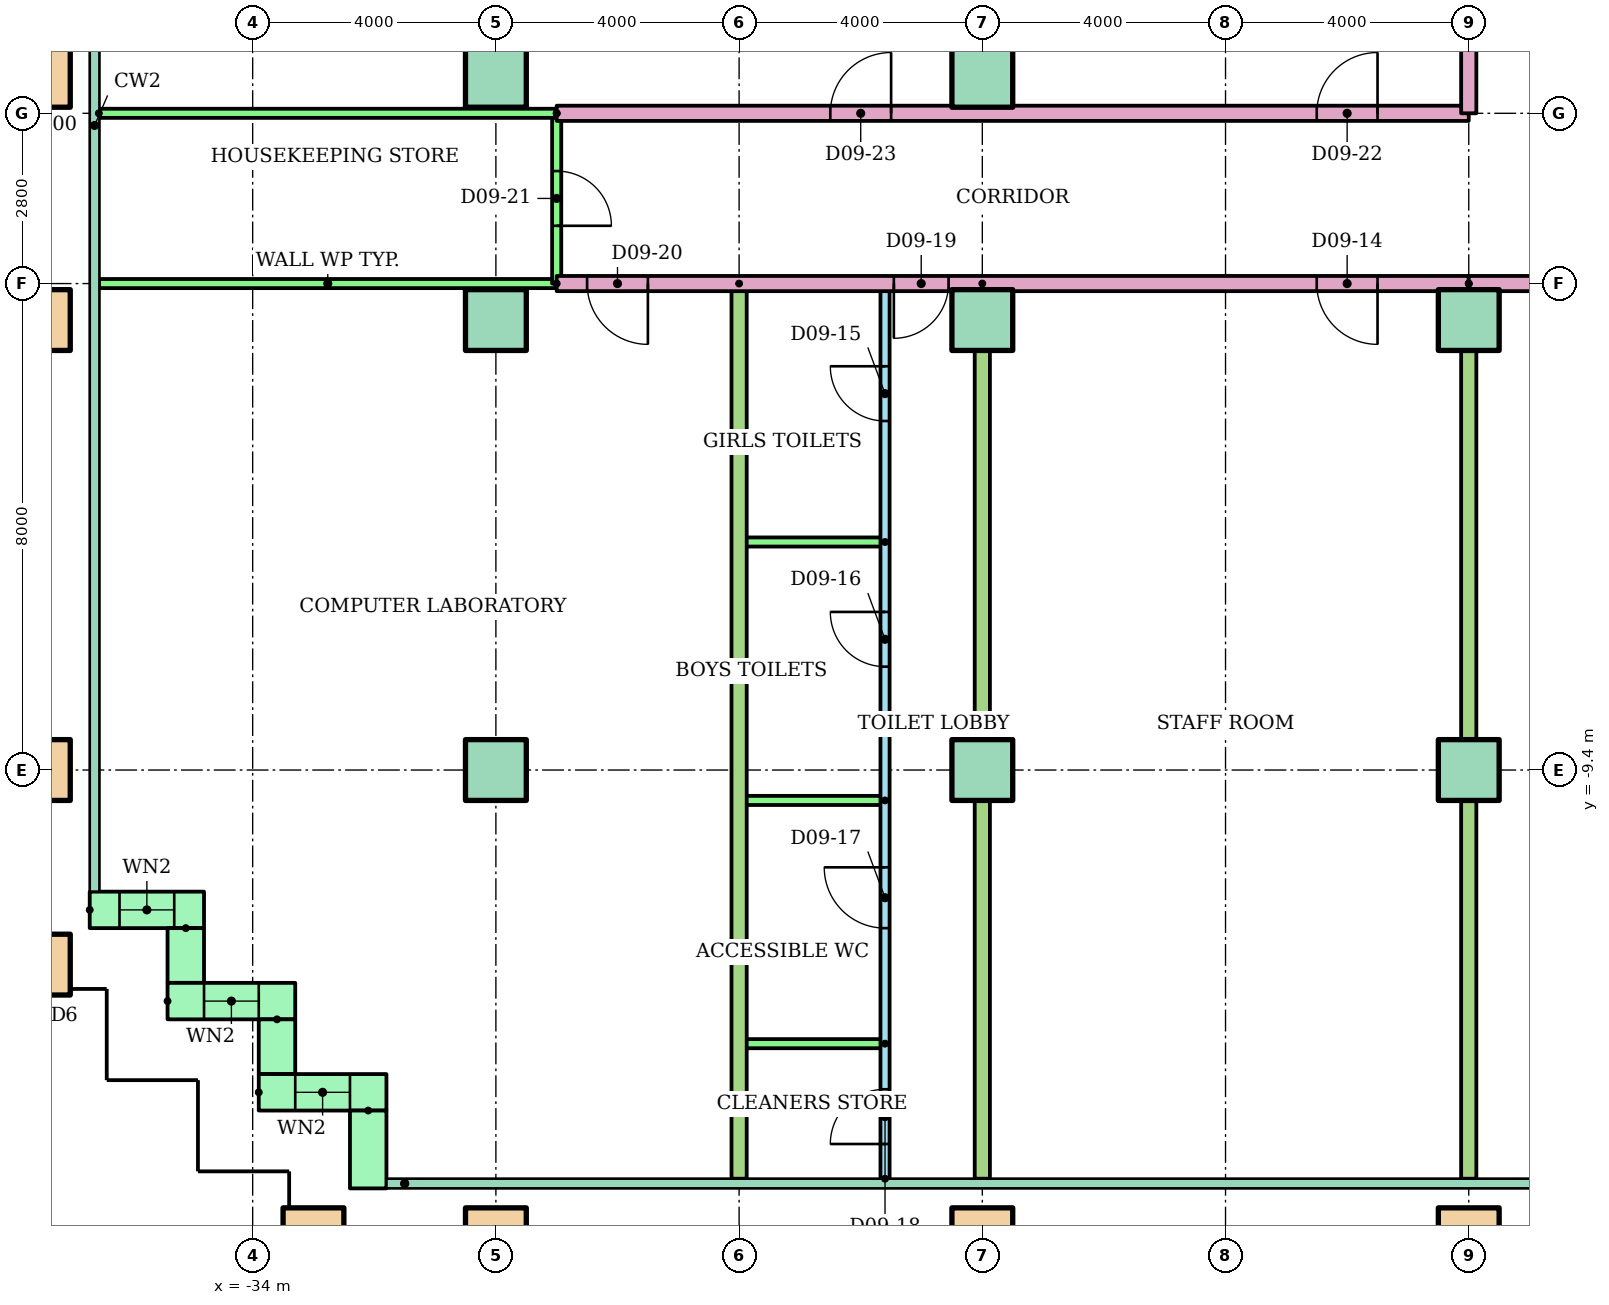
"""IFC4 building model, lengths in metres.
Left out: names, types, materials, properties, quantities, classifications, styles, units other than length and angle.
Written with IfcOpenShell. Run it as: python <this file> out.ifc"""

import sys

from ifc_helpers import new_model, si_unit, direction, frame, frame_2d, origin, origin_2d, place, context, subcontext, project, spatial, rectangle, hollow_rectangle, extrude, element, fill, save


model = new_model("IFC4")
c1 = context("Model", 3, precision=1e-05, world=origin(), true_north=direction((0.0, 1.0)))
c2 = subcontext(c1, "Body", "Model", "MODEL_VIEW")
j1 = project(units=[si_unit("LENGTHUNIT", "METRE"), si_unit("PLANEANGLEUNIT", "RADIAN")], contexts=[c1])
p1 = place(None, origin())
s1 = spatial("IfcSite", under=j1, at=p1, CompositionType="ELEMENT")
p2 = place(p1, origin())
s2 = spatial("IfcBuilding", under=s1, at=p2, CompositionType="ELEMENT")
p3 = place(p2, frame((0.0, 0.0, 37.7)))
s3 = spatial("IfcBuildingStorey", under=s2, at=p3, CompositionType="ELEMENT", Elevation=37.7)
for number, where in (
    (1, (-33.0, -17.1, 0.0)),
    (2, (-30.0, -17.1, 0.0)),
    (3, (-22.0, -17.1, 0.0)),
    (4, (-14.0, -17.1, 0.0)),
    (5, (-37.5, -12.6, 0.0)),
    (6, (-37.5, -9.4, 0.0)),
):
    element("IfcColumn", number, at=place(p3, frame(where)), inside=s3, PredefinedType="COLUMN", context=c2, shape_type="SweptSolid", body=[
        extrude(hollow_rectangle(XDim=1.0, YDim=1.0, WallThickness=0.05, at=origin_2d()), origin(), (0.0, 0.0, 1.0), 3.9),
    ])
for number, where in (
    (7, (-30.0, -9.4, 0.0)),
    (8, (-22.0, -9.4, 0.0)),
    (9, (-14.0, -9.4, 0.0)),
):
    element("IfcColumn", number, at=place(p3, frame(where)), inside=s3, PredefinedType="COLUMN", context=c2, shape_type="SweptSolid", body=[
        extrude(rectangle(XDim=1.0, YDim=1.0, at=origin_2d()), origin(), (0.0, 0.0, 1.0), 3.9),
    ])
p4 = place(p3, frame((-37.5, -2.0, 0.0)))
e10 = element("IfcColumn", 10, at=p4, inside=s3, PredefinedType="COLUMN", context=c2, shape_type="SweptSolid", body=[
    extrude(hollow_rectangle(XDim=1.0, YDim=1.0, WallThickness=0.05, at=origin_2d()), origin(), (0.0, 0.0, 1.0), 3.9),
])
for number, where in (
    (11, (-30.0, -2.0, 0.0)),
    (12, (-22.0, -2.0, 0.0)),
    (13, (-14.0, -2.0, 0.0)),
):
    element("IfcColumn", number, at=place(p3, frame(where)), inside=s3, PredefinedType="COLUMN", context=c2, shape_type="SweptSolid", body=[
        extrude(rectangle(XDim=1.0, YDim=1.0, at=origin_2d()), origin(), (0.0, 0.0, 1.0), 3.9),
    ])
p5 = place(p3, frame((-37.5, 2.0, 0.0)))
e14 = element("IfcColumn", 14, at=p5, inside=s3, PredefinedType="COLUMN", context=c2, shape_type="SweptSolid", body=[
    extrude(hollow_rectangle(XDim=1.0, YDim=1.0, WallThickness=0.05, at=origin_2d()), origin(), (0.0, 0.0, 1.0), 3.9),
])
for number, where in (
    (15, (-30.0, 2.0, 0.0)),
    (16, (-22.0, 2.0, 0.0)),
):
    element("IfcColumn", number, at=place(p3, frame(where)), inside=s3, PredefinedType="COLUMN", context=c2, shape_type="SweptSolid", body=[
        extrude(rectangle(XDim=1.0, YDim=1.0, at=origin_2d()), origin(), (0.0, 0.0, 1.0), 3.9),
    ])
p6 = place(p3, frame((-36.68, -11.7, 0.0)))
e17 = element("IfcWall", 17, at=p6, inside=s3, PredefinedType="STANDARD", context=c2, shape_type="SweptSolid", body=[
    extrude(rectangle(XDim=1.88, YDim=0.6, at=frame_2d((0.94, 0.0))), origin(), (0.0, 0.0, 1.0), 3.62),
])
p7 = place(p6, frame((0.49, 0.0, 0.9)))
e18 = element("IfcOpeningElement", 18, at=p7, cuts=e17, PredefinedType="OPENING", context=c2, shape_type="SweptSolid", body=[
    extrude(rectangle(XDim=0.9, YDim=1.8, at=frame_2d((0.45, 0.9))), frame((0.0, 0.31, 0.0), z_axis=(0.0, -1.0, 0.0), x_axis=(1.0, 0.0, 0.0)), (0.0, 0.0, 1.0), 0.62),
])
p8 = place(p3, frame((-35.1, -12.0, 0.0), z_axis=(0.0, 0.0, 1.0), x_axis=(0.0, -1.0, 0.0)))
e19 = element("IfcWall", 19, at=p8, inside=s3, PredefinedType="STANDARD", context=c2, shape_type="SweptSolid", body=[
    extrude(rectangle(XDim=0.9, YDim=0.6, at=frame_2d((0.45, 0.0))), origin(), (0.0, 0.0, 1.0), 3.62),
])
p9 = place(p3, frame((-35.4, -13.2, 0.0)))
e20 = element("IfcWall", 20, at=p9, inside=s3, PredefinedType="STANDARD", context=c2, shape_type="SweptSolid", body=[
    extrude(rectangle(XDim=2.1, YDim=0.6, at=frame_2d((1.05, 0.0))), origin(), (0.0, 0.0, 1.0), 3.62),
])
p10 = place(p9, frame((0.6, 0.0, 0.9)))
e21 = element("IfcOpeningElement", 21, at=p10, cuts=e20, PredefinedType="OPENING", context=c2, shape_type="SweptSolid", body=[
    extrude(rectangle(XDim=0.9, YDim=1.8, at=frame_2d((0.45, 0.9))), frame((0.0, 0.31, 0.0), z_axis=(0.0, -1.0, 0.0), x_axis=(1.0, 0.0, 0.0)), (0.0, 0.0, 1.0), 0.62),
])
p11 = place(p3, frame((-33.6, -13.5, 0.0), z_axis=(0.0, 0.0, 1.0), x_axis=(0.0, -1.0, 0.0)))
e22 = element("IfcWall", 22, at=p11, inside=s3, PredefinedType="STANDARD", context=c2, shape_type="SweptSolid", body=[
    extrude(rectangle(XDim=0.9, YDim=0.6, at=frame_2d((0.45, 0.0))), origin(), (0.0, 0.0, 1.0), 3.62),
])
p12 = place(p3, frame((-33.9, -14.7, 0.0)))
e23 = element("IfcWall", 23, at=p12, inside=s3, PredefinedType="STANDARD", context=c2, shape_type="SweptSolid", body=[
    extrude(rectangle(XDim=2.1, YDim=0.6, at=frame_2d((1.05, 0.0))), origin(), (0.0, 0.0, 1.0), 3.62),
])
p13 = place(p12, frame((0.6, 0.0, 0.9)))
e24 = element("IfcOpeningElement", 24, at=p13, cuts=e23, PredefinedType="OPENING", context=c2, shape_type="SweptSolid", body=[
    extrude(rectangle(XDim=0.9, YDim=1.8, at=frame_2d((0.45, 0.9))), frame((0.0, 0.31, 0.0), z_axis=(0.0, -1.0, 0.0), x_axis=(1.0, 0.0, 0.0)), (0.0, 0.0, 1.0), 0.62),
])
p14 = place(p3, frame((-32.1, -15.0, 0.0), z_axis=(0.0, 0.0, 1.0), x_axis=(0.0, -1.0, 0.0)))
e25 = element("IfcWall", 25, at=p14, inside=s3, PredefinedType="STANDARD", context=c2, shape_type="SweptSolid", body=[
    extrude(rectangle(XDim=1.28, YDim=0.6, at=frame_2d((0.64, 0.0))), origin(), (0.0, 0.0, 1.0), 3.62),
])
p15 = place(p3, frame((-14.0, -1.4, 0.0), z_axis=(0.0, 0.0, 1.0), x_axis=(-1.0, 0.0, 0.0)))
e26 = element("IfcWall", 26, at=p15, inside=s3, PredefinedType="PARTITIONING", context=c2, shape_type="SweptSolid", body=[
    extrude(rectangle(XDim=15.0, YDim=0.25, at=frame_2d((7.5, 0.0))), origin(), (0.0, 0.0, 1.0), 3.1),
])
p16 = place(p15, frame((1.5, 0.0, 0.0)))
e27 = element("IfcOpeningElement", 27, at=p16, cuts=e26, PredefinedType="OPENING", context=c2, shape_type="SweptSolid", body=[
    extrude(rectangle(XDim=1.0, YDim=2.1, at=frame_2d((0.5, 1.05))), frame((0.0, 0.135, 0.0), z_axis=(0.0, -1.0, 0.0), x_axis=(1.0, 0.0, 0.0)), (0.0, 0.0, 1.0), 0.27),
])
p17 = place(p15, frame((8.555, 0.0, 0.0)))
e28 = element("IfcOpeningElement", 28, at=p17, cuts=e26, PredefinedType="OPENING", context=c2, shape_type="SweptSolid", body=[
    extrude(rectangle(XDim=0.9, YDim=2.1, at=frame_2d((0.45, 1.05))), frame((0.0, 0.135, 0.0), z_axis=(0.0, -1.0, 0.0), x_axis=(1.0, 0.0, 0.0)), (0.0, 0.0, 1.0), 0.27),
])
p18 = place(p15, frame((13.5, 0.0, 0.0)))
e29 = element("IfcOpeningElement", 29, at=p18, cuts=e26, PredefinedType="OPENING", context=c2, shape_type="SweptSolid", body=[
    extrude(rectangle(XDim=1.0, YDim=2.1, at=frame_2d((0.5, 1.05))), frame((0.0, 0.135, 0.0), z_axis=(0.0, -1.0, 0.0), x_axis=(1.0, 0.0, 0.0)), (0.0, 0.0, 1.0), 0.27),
])
p19 = place(p3, frame((-29.0, -1.4, 0.0), z_axis=(0.0, 0.0, 1.0), x_axis=(-1.0, 0.0, 0.0)))
e30 = element("IfcWall", 30, at=p19, inside=s3, PredefinedType="PARTITIONING", context=c2, shape_type="SweptSolid", body=[
    extrude(rectangle(XDim=7.53, YDim=0.15, at=frame_2d((3.765, 0.0))), origin(), (0.0, 0.0, 1.0), 3.1),
])
p20 = place(p3, frame((-29.0, 1.4, 0.0), z_axis=(0.0, 0.0, 1.0), x_axis=(0.0, -1.0, 0.0)))
e31 = element("IfcWall", 31, at=p20, inside=s3, PredefinedType="PARTITIONING", context=c2, shape_type="SweptSolid", body=[
    extrude(rectangle(XDim=2.8, YDim=0.15, at=frame_2d((1.4, 0.0))), origin(), (0.0, 0.0, 1.0), 3.1),
])
p21 = place(p20, frame((0.95, 0.0, 0.0)))
e32 = element("IfcOpeningElement", 32, at=p21, cuts=e31, PredefinedType="OPENING", context=c2, shape_type="SweptSolid", body=[
    extrude(rectangle(XDim=0.9, YDim=2.1, at=frame_2d((0.45, 1.05))), frame((0.0, 0.085, 0.0), z_axis=(0.0, -1.0, 0.0), x_axis=(1.0, 0.0, 0.0)), (0.0, 0.0, 1.0), 0.17),
])
p22 = place(p3, frame((-23.6, -16.121, 0.0), z_axis=(0.0, 0.0, 1.0), x_axis=(0.0, 1.0, 0.0)))
e33 = element("IfcWall", 33, at=p22, inside=s3, PredefinedType="PARTITIONING", context=c2, shape_type="SweptSolid", body=[
    extrude(rectangle(XDim=14.721, YDim=0.15, at=frame_2d((7.361, 0.0))), origin(), (0.0, 0.0, 1.0), 3.1),
])
p23 = place(p22, frame((12.461, 0.0, 0.0)))
e34 = element("IfcOpeningElement", 34, at=p23, cuts=e33, PredefinedType="OPENING", context=c2, shape_type="SweptSolid", body=[
    extrude(rectangle(XDim=0.9, YDim=2.1, at=frame_2d((0.45, 1.05))), frame((0.0, 0.085, 0.0), z_axis=(0.0, -1.0, 0.0), x_axis=(1.0, 0.0, 0.0)), (0.0, 0.0, 1.0), 0.17),
])
p24 = place(p22, frame((8.421, 0.0, 0.0)))
e35 = element("IfcOpeningElement", 35, at=p24, cuts=e33, PredefinedType="OPENING", context=c2, shape_type="SweptSolid", body=[
    extrude(rectangle(XDim=0.9, YDim=2.1, at=frame_2d((0.45, 1.05))), frame((0.0, 0.085, 0.0), z_axis=(0.0, -1.0, 0.0), x_axis=(1.0, 0.0, 0.0)), (0.0, 0.0, 1.0), 0.17),
])
p25 = place(p22, frame((4.121, 0.0, 0.0)))
e36 = element("IfcOpeningElement", 36, at=p25, cuts=e33, PredefinedType="OPENING", context=c2, shape_type="SweptSolid", body=[
    extrude(rectangle(XDim=1.0, YDim=2.1, at=frame_2d((0.5, 1.05))), frame((0.0, 0.085, 0.0), z_axis=(0.0, -1.0, 0.0), x_axis=(1.0, 0.0, 0.0)), (0.0, 0.0, 1.0), 0.17),
])
p26 = place(p22, frame((0.571, 0.0, 0.0)))
e37 = element("IfcOpeningElement", 37, at=p26, cuts=e33, PredefinedType="OPENING", context=c2, shape_type="SweptSolid", body=[
    extrude(rectangle(XDim=0.9, YDim=2.1, at=frame_2d((0.45, 1.05))), frame((0.0, 0.085, 0.0), z_axis=(0.0, -1.0, 0.0), x_axis=(1.0, 0.0, 0.0)), (0.0, 0.0, 1.0), 0.17),
])
for number, where, z_axis, x_axis in (
    (38, (-23.6, -5.65, 0.0), (0.0, 0.0, 1.0), (-1.0, 0.0, 0.0)),
    (39, (-23.6, -9.9, 0.0), (0.0, 0.0, 1.0), (-1.0, 0.0, 0.0)),
    (40, (-23.6, -13.9, 0.0), (0.0, 0.0, 1.0), (-1.0, 0.0, 0.0)),
):
    element("IfcWall", number, at=place(p3, frame(where, z_axis=z_axis, x_axis=x_axis)), inside=s3, PredefinedType="PARTITIONING", context=c2, shape_type="SweptSolid", body=[
        extrude(rectangle(XDim=2.4, YDim=0.15, at=frame_2d((1.2, 0.0))), origin(), (0.0, 0.0, 1.0), 3.1),
    ])
for number, where, z_axis, x_axis in (
    (41, (-26.0, -1.4, 0.0), (0.0, 0.0, 1.0), (0.0, -1.0, 0.0)),
    (42, (-22.0, -1.4, 0.0), (0.0, 0.0, 1.0), (0.0, -1.0, 0.0)),
    (43, (-14.0, -1.4, 0.0), (0.0, 0.0, 1.0), (0.0, -1.0, 0.0)),
):
    element("IfcWall", number, at=place(p3, frame(where, z_axis=z_axis, x_axis=x_axis)), inside=s3, PredefinedType="PARTITIONING", context=c2, shape_type="SweptSolid", body=[
        extrude(rectangle(XDim=14.721, YDim=0.25, at=frame_2d((7.361, 0.0))), origin(), (0.0, 0.0, 1.0), 3.1),
    ])
p27 = place(p3, frame((-29.0, 1.4, 0.0)))
e44 = element("IfcWall", 44, at=p27, inside=s3, PredefinedType="PARTITIONING", context=c2, shape_type="SweptSolid", body=[
    extrude(rectangle(XDim=15.0, YDim=0.25, at=frame_2d((7.5, 0.0))), origin(), (0.0, 0.0, 1.0), 3.1),
])
p28 = place(p27, frame((12.5, 0.0, 0.0)))
e45 = element("IfcOpeningElement", 45, at=p28, cuts=e44, PredefinedType="OPENING", context=c2, shape_type="SweptSolid", body=[
    extrude(rectangle(XDim=1.0, YDim=2.1, at=frame_2d((0.5, 1.05))), frame((0.0, 0.135, 0.0), z_axis=(0.0, -1.0, 0.0), x_axis=(1.0, 0.0, 0.0)), (0.0, 0.0, 1.0), 0.27),
])
p29 = place(p27, frame((4.5, 0.0, 0.0)))
e46 = element("IfcOpeningElement", 46, at=p29, cuts=e44, PredefinedType="OPENING", context=c2, shape_type="SweptSolid", body=[
    extrude(rectangle(XDim=1.0, YDim=2.1, at=frame_2d((0.5, 1.05))), frame((0.0, 0.135, 0.0), z_axis=(0.0, -1.0, 0.0), x_axis=(1.0, 0.0, 0.0)), (0.0, 0.0, 1.0), 0.27),
])
p30 = place(p3, frame((-36.53, 1.4, 0.0)))
e47 = element("IfcWall", 47, at=p30, inside=s3, PredefinedType="PARTITIONING", context=c2, shape_type="SweptSolid", body=[
    extrude(rectangle(XDim=7.53, YDim=0.15, at=frame_2d((3.765, 0.0))), origin(), (0.0, 0.0, 1.0), 3.1),
])
p31 = place(p3, frame((-22.0, 18.521, 0.0), z_axis=(0.0, 0.0, 1.0), x_axis=(0.0, -1.0, 0.0)))
e48 = element("IfcWall", 48, at=p31, inside=s3, PredefinedType="PARTITIONING", context=c2, shape_type="SweptSolid", body=[
    extrude(rectangle(XDim=17.121, YDim=0.25, at=frame_2d((8.561, 0.0))), origin(), (0.0, 0.0, 1.0), 3.1),
])
p32 = place(p3, frame((14.0, -1.4, 0.0), z_axis=(0.0, 0.0, 1.0), x_axis=(-1.0, 0.0, 0.0)))
e49 = element("IfcWall", 49, at=p32, inside=s3, PredefinedType="PARTITIONING", context=c2, shape_type="SweptSolid", body=[
    extrude(rectangle(XDim=28.0, YDim=0.25, at=frame_2d((14.0, 0.0))), origin(), (0.0, 0.0, 1.0), 3.1),
])
p33 = place(p32, frame((21.5, 0.0, 0.0)))
e50 = element("IfcOpeningElement", 50, at=p33, cuts=e49, PredefinedType="OPENING", context=c2, shape_type="SweptSolid", body=[
    extrude(rectangle(XDim=1.0, YDim=2.1, at=frame_2d((0.5, 1.05))), frame((0.0, 0.135, 0.0), z_axis=(0.0, -1.0, 0.0), x_axis=(1.0, 0.0, 0.0)), (0.0, 0.0, 1.0), 0.27),
])
p34 = place(p32, frame((17.5, 0.0, 0.0)))
e51 = element("IfcOpeningElement", 51, at=p34, cuts=e49, PredefinedType="OPENING", context=c2, shape_type="SweptSolid", body=[
    extrude(rectangle(XDim=1.0, YDim=2.1, at=frame_2d((0.5, 1.05))), frame((0.0, 0.135, 0.0), z_axis=(0.0, -1.0, 0.0), x_axis=(1.0, 0.0, 0.0)), (0.0, 0.0, 1.0), 0.27),
])
p35 = place(p32, frame((1.5, 0.0, 0.0)))
e52 = element("IfcOpeningElement", 52, at=p35, cuts=e49, PredefinedType="OPENING", context=c2, shape_type="SweptSolid", body=[
    extrude(rectangle(XDim=1.0, YDim=2.1, at=frame_2d((0.5, 1.05))), frame((0.0, 0.135, 0.0), z_axis=(0.0, -1.0, 0.0), x_axis=(1.0, 0.0, 0.0)), (0.0, 0.0, 1.0), 0.27),
])
p36 = place(p3, frame((-14.0, 3.0, 0.0), z_axis=(0.0, 0.0, 1.0), x_axis=(0.0, -1.0, 0.0)))
e53 = element("IfcWall", 53, at=p36, inside=s3, PredefinedType="PARTITIONING", context=c2, shape_type="SweptSolid", body=[
    extrude(rectangle(XDim=1.6, YDim=0.25, at=frame_2d((0.8, 0.0))), origin(), (0.0, 0.0, 1.0), 3.1),
])
p37 = place(p7, origin())
e54 = element("IfcWindow", 54, at=p37, inside=s3, PartitioningType="SINGLE_PANEL", PredefinedType="WINDOW", context=c2, shape_type="SweptSolid", body=[
    extrude(rectangle(XDim=0.9, YDim=1.8, at=frame_2d((0.45, 0.9))), frame((0.0, 0.03, 0.0), z_axis=(0.0, -1.0, 0.0), x_axis=(1.0, 0.0, 0.0)), (0.0, 0.0, 1.0), 0.06),
])
fill(e18, e54)
p38 = place(p10, origin())
e55 = element("IfcWindow", 55, at=p38, inside=s3, PartitioningType="SINGLE_PANEL", PredefinedType="WINDOW", context=c2, shape_type="SweptSolid", body=[
    extrude(rectangle(XDim=0.9, YDim=1.8, at=frame_2d((0.45, 0.9))), frame((0.0, 0.03, 0.0), z_axis=(0.0, -1.0, 0.0), x_axis=(1.0, 0.0, 0.0)), (0.0, 0.0, 1.0), 0.06),
])
fill(e21, e55)
p39 = place(p13, origin())
e56 = element("IfcWindow", 56, at=p39, inside=s3, PartitioningType="SINGLE_PANEL", PredefinedType="WINDOW", context=c2, shape_type="SweptSolid", body=[
    extrude(rectangle(XDim=0.9, YDim=1.8, at=frame_2d((0.45, 0.9))), frame((0.0, 0.03, 0.0), z_axis=(0.0, -1.0, 0.0), x_axis=(1.0, 0.0, 0.0)), (0.0, 0.0, 1.0), 0.06),
])
fill(e24, e56)
p40 = place(p16, origin())
e57 = element("IfcDoor", 57, at=p40, inside=s3, OperationType="SINGLE_SWING_LEFT", PredefinedType="DOOR", context=c2, shape_type="SweptSolid", body=[
    extrude(rectangle(XDim=1.0, YDim=2.1, at=frame_2d((0.5, 1.05))), frame((0.0, 0.025, 0.0), z_axis=(0.0, -1.0, 0.0), x_axis=(1.0, 0.0, 0.0)), (0.0, 0.0, 1.0), 0.05),
])
fill(e27, e57)
p41 = place(p23, origin())
e58 = element("IfcDoor", 58, at=p41, inside=s3, OperationType="SINGLE_SWING_RIGHT", PredefinedType="DOOR", context=c2, shape_type="SweptSolid", body=[
    extrude(rectangle(XDim=0.9, YDim=2.1, at=frame_2d((0.45, 1.05))), frame((0.0, 0.025, 0.0), z_axis=(0.0, -1.0, 0.0), x_axis=(1.0, 0.0, 0.0)), (0.0, 0.0, 1.0), 0.05),
])
fill(e34, e58)
p42 = place(p24, origin())
e59 = element("IfcDoor", 59, at=p42, inside=s3, OperationType="SINGLE_SWING_RIGHT", PredefinedType="DOOR", context=c2, shape_type="SweptSolid", body=[
    extrude(rectangle(XDim=0.9, YDim=2.1, at=frame_2d((0.45, 1.05))), frame((0.0, 0.025, 0.0), z_axis=(0.0, -1.0, 0.0), x_axis=(1.0, 0.0, 0.0)), (0.0, 0.0, 1.0), 0.05),
])
fill(e35, e59)
p43 = place(p25, origin())
e60 = element("IfcDoor", 60, at=p43, inside=s3, OperationType="SINGLE_SWING_RIGHT", PredefinedType="DOOR", context=c2, shape_type="SweptSolid", body=[
    extrude(rectangle(XDim=1.0, YDim=2.1, at=frame_2d((0.5, 1.05))), frame((0.0, 0.025, 0.0), z_axis=(0.0, -1.0, 0.0), x_axis=(1.0, 0.0, 0.0)), (0.0, 0.0, 1.0), 0.05),
])
fill(e36, e60)
p44 = place(p26, origin())
e61 = element("IfcDoor", 61, at=p44, inside=s3, OperationType="SINGLE_SWING_LEFT", PredefinedType="DOOR", context=c2, shape_type="SweptSolid", body=[
    extrude(rectangle(XDim=0.9, YDim=2.1, at=frame_2d((0.45, 1.05))), frame((0.0, 0.025, 0.0), z_axis=(0.0, -1.0, 0.0), x_axis=(1.0, 0.0, 0.0)), (0.0, 0.0, 1.0), 0.05),
])
fill(e37, e61)
p45 = place(p17, origin())
e62 = element("IfcDoor", 62, at=p45, inside=s3, OperationType="SINGLE_SWING_RIGHT", PredefinedType="DOOR", context=c2, shape_type="SweptSolid", body=[
    extrude(rectangle(XDim=0.9, YDim=2.1, at=frame_2d((0.45, 1.05))), frame((0.0, 0.025, 0.0), z_axis=(0.0, -1.0, 0.0), x_axis=(1.0, 0.0, 0.0)), (0.0, 0.0, 1.0), 0.05),
])
fill(e28, e62)
p46 = place(p18, origin())
e63 = element("IfcDoor", 63, at=p46, inside=s3, OperationType="SINGLE_SWING_LEFT", PredefinedType="DOOR", context=c2, shape_type="SweptSolid", body=[
    extrude(rectangle(XDim=1.0, YDim=2.1, at=frame_2d((0.5, 1.05))), frame((0.0, 0.025, 0.0), z_axis=(0.0, -1.0, 0.0), x_axis=(1.0, 0.0, 0.0)), (0.0, 0.0, 1.0), 0.05),
])
fill(e29, e63)
p47 = place(p21, origin())
e64 = element("IfcDoor", 64, at=p47, inside=s3, OperationType="SINGLE_SWING_RIGHT", PredefinedType="DOOR", context=c2, shape_type="SweptSolid", body=[
    extrude(rectangle(XDim=0.9, YDim=2.1, at=frame_2d((0.45, 1.05))), frame((0.0, 0.025, 0.0), z_axis=(0.0, -1.0, 0.0), x_axis=(1.0, 0.0, 0.0)), (0.0, 0.0, 1.0), 0.05),
])
fill(e32, e64)
p48 = place(p28, origin())
e65 = element("IfcDoor", 65, at=p48, inside=s3, OperationType="SINGLE_SWING_RIGHT", PredefinedType="DOOR", context=c2, shape_type="SweptSolid", body=[
    extrude(rectangle(XDim=1.0, YDim=2.1, at=frame_2d((0.5, 1.05))), frame((0.0, 0.025, 0.0), z_axis=(0.0, -1.0, 0.0), x_axis=(1.0, 0.0, 0.0)), (0.0, 0.0, 1.0), 0.05),
])
fill(e45, e65)
p49 = place(p29, origin())
e66 = element("IfcDoor", 66, at=p49, inside=s3, OperationType="SINGLE_SWING_RIGHT", PredefinedType="DOOR", context=c2, shape_type="SweptSolid", body=[
    extrude(rectangle(XDim=1.0, YDim=2.1, at=frame_2d((0.5, 1.05))), frame((0.0, 0.025, 0.0), z_axis=(0.0, -1.0, 0.0), x_axis=(1.0, 0.0, 0.0)), (0.0, 0.0, 1.0), 0.05),
])
fill(e46, e66)
save(model, sys.argv[1])
